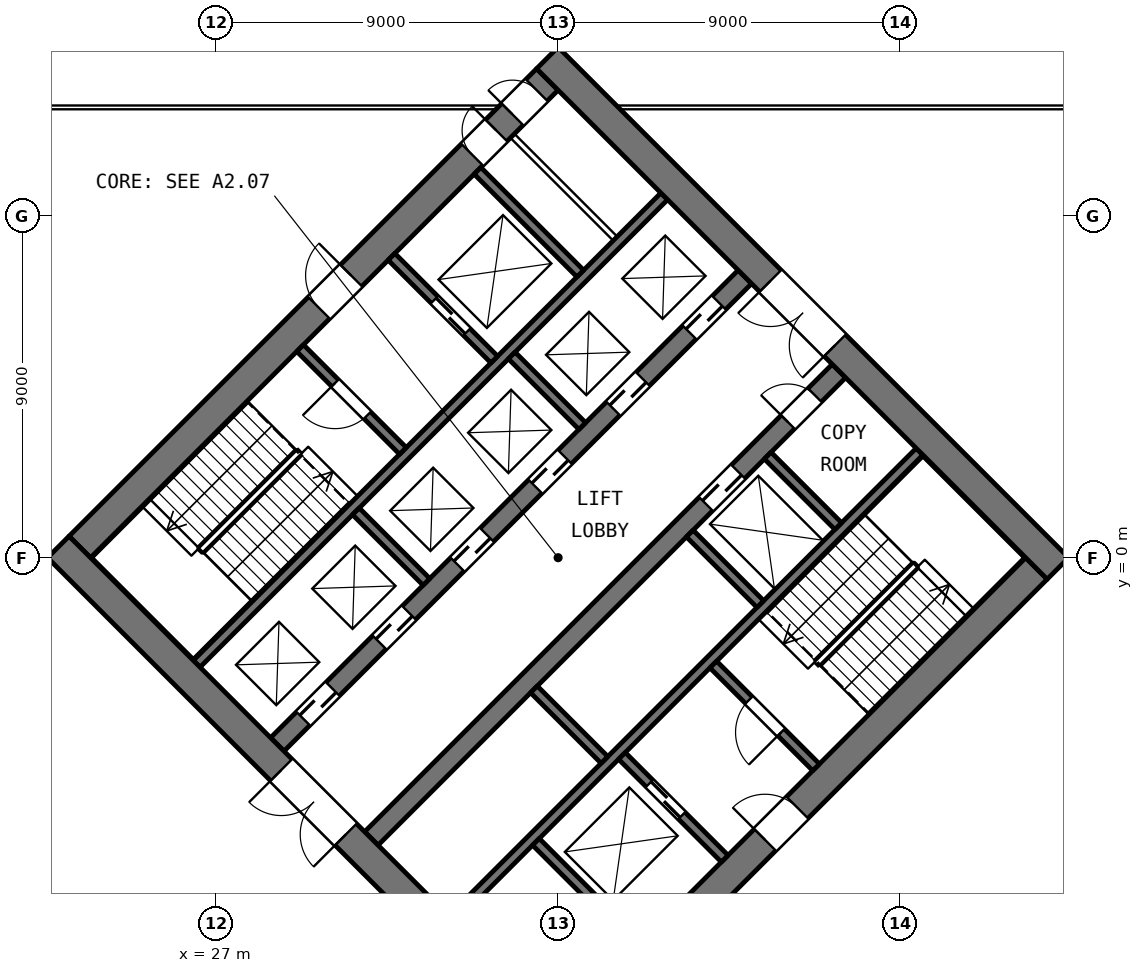
"""IFC4 building model, lengths in metres.
Left out: names, types, materials, properties, quantities, classifications, styles, units other than length and angle.
Written with IfcOpenShell. Run it as: python <this file> out.ifc"""

import sys

from ifc_helpers import new_model, si_unit, direction, frame, frame_2d, origin, place, context, subcontext, project, spatial, rectangle, extrude, element, fill, save


model = new_model("IFC4")
c1 = context("Model", 3, precision=1e-05, world=origin(), true_north=direction((0.0, 1.0)))
c2 = subcontext(c1, "Body", "Model", "MODEL_VIEW")
j1 = project(units=[si_unit("LENGTHUNIT", "METRE"), si_unit("PLANEANGLEUNIT", "RADIAN")], contexts=[c1])
p1 = place(None, origin())
s1 = spatial("IfcSite", under=j1, at=p1, CompositionType="ELEMENT")
p2 = place(p1, origin())
s2 = spatial("IfcBuilding", under=s1, at=p2, CompositionType="ELEMENT")
p3 = place(p2, frame((0.0, 0.0, 22.8)))
s3 = spatial("IfcBuildingStorey", under=s2, at=p3, CompositionType="ELEMENT", Elevation=22.8)
p4 = place(p3, frame((36.283, -12.586, 0.0), z_axis=(0.0, 0.0, 1.0), x_axis=(0.707106781187, 0.707106781187, 0.0)))
e1 = element("IfcWall", 1, at=p4, inside=s3, PredefinedType="SHEAR", context=c2, shape_type="SweptSolid", body=[
    extrude(rectangle(XDim=17.4, YDim=0.8, at=frame_2d((8.7, 0.0))), origin(), (0.0, 0.0, 1.0), 4.5),
])
p5 = place(p4, frame((7.3, 0.0, 0.0)))
e2 = element("IfcOpeningElement", 2, at=p5, cuts=e1, PredefinedType="OPENING", context=c2, shape_type="SweptSolid", body=[
    extrude(rectangle(XDim=1.2, YDim=2.1, at=frame_2d((0.6, 1.05))), frame((0.0, 0.41, 0.0), z_axis=(0.0, -1.0, 0.0), x_axis=(1.0, 0.0, 0.0)), (0.0, 0.0, 1.0), 0.82),
])
p6 = place(p4, frame((1.0, 0.0, 0.0)))
e3 = element("IfcOpeningElement", 3, at=p6, cuts=e1, PredefinedType="OPENING", context=c2, shape_type="SweptSolid", body=[
    extrude(rectangle(XDim=1.0, YDim=2.1, at=frame_2d((0.5, 1.05))), frame((0.0, 0.41, 0.0), z_axis=(0.0, -1.0, 0.0), x_axis=(1.0, 0.0, 0.0)), (0.0, 0.0, 1.0), 0.82),
])
p7 = place(p3, frame((33.207, -9.51, 0.0), z_axis=(0.0, 0.0, 1.0), x_axis=(0.707106781187, 0.707106781187, 0.0)))
e4 = element("IfcWall", 4, at=p7, inside=s3, PredefinedType="SHEAR", context=c2, shape_type="SweptSolid", body=[
    extrude(rectangle(XDim=17.4, YDim=0.25, at=frame_2d((8.7, 0.0))), origin(), (0.0, 0.0, 1.0), 4.5),
])
p8 = place(p3, frame((31.086, -7.389, 0.0), z_axis=(0.0, 0.0, 1.0), x_axis=(0.707106781187, 0.707106781187, 0.0)))
e5 = element("IfcWall", 5, at=p8, inside=s3, PredefinedType="SHEAR", context=c2, shape_type="SweptSolid", body=[
    extrude(rectangle(XDim=17.4, YDim=0.5, at=frame_2d((8.7, 0.0))), origin(), (0.0, 0.0, 1.0), 4.5),
])
p9 = place(p8, frame((12.45, 0.0, 0.0)))
e6 = element("IfcOpeningElement", 6, at=p9, cuts=e5, PredefinedType="OPENING", context=c2, shape_type="SweptSolid", body=[
    extrude(rectangle(XDim=1.2, YDim=2.1, at=frame_2d((0.6, 1.05))), frame((0.0, 0.26, 0.0), z_axis=(0.0, -1.0, 0.0), x_axis=(1.0, 0.0, 0.0)), (0.0, 0.0, 1.0), 0.52),
])
p10 = place(p8, frame((15.5, 0.0, 0.0)))
e7 = element("IfcOpeningElement", 7, at=p10, cuts=e5, PredefinedType="OPENING", context=c2, shape_type="SweptSolid", body=[
    extrude(rectangle(XDim=1.0, YDim=2.1, at=frame_2d((0.5, 1.05))), frame((0.0, 0.26, 0.0), z_axis=(0.0, -1.0, 0.0), x_axis=(1.0, 0.0, 0.0)), (0.0, 0.0, 1.0), 0.52),
])
p11 = place(p3, frame((28.611, -4.914, 0.0), z_axis=(0.0, 0.0, 1.0), x_axis=(0.707106781187, 0.707106781187, 0.0)))
e8 = element("IfcWall", 8, at=p11, inside=s3, PredefinedType="SHEAR", context=c2, shape_type="SweptSolid", body=[
    extrude(rectangle(XDim=17.4, YDim=0.5, at=frame_2d((8.7, 0.0))), origin(), (0.0, 0.0, 1.0), 4.5),
])
p12 = place(p11, frame((0.962, 0.0, 0.0)))
e9 = element("IfcOpeningElement", 9, at=p12, cuts=e8, PredefinedType="OPENING", context=c2, shape_type="SweptSolid", body=[
    extrude(rectangle(XDim=1.1, YDim=2.1, at=frame_2d((0.55, 1.05))), frame((0.0, 0.26, 0.0), z_axis=(0.0, -1.0, 0.0), x_axis=(1.0, 0.0, 0.0)), (0.0, 0.0, 1.0), 0.52),
])
p13 = place(p11, frame((3.8, 0.0, 0.0)))
e10 = element("IfcOpeningElement", 10, at=p13, cuts=e8, PredefinedType="OPENING", context=c2, shape_type="SweptSolid", body=[
    extrude(rectangle(XDim=1.1, YDim=2.1, at=frame_2d((0.55, 1.05))), frame((0.0, 0.26, 0.0), z_axis=(0.0, -1.0, 0.0), x_axis=(1.0, 0.0, 0.0)), (0.0, 0.0, 1.0), 0.52),
])
p14 = place(p11, frame((6.7, 0.0, 0.0)))
e11 = element("IfcOpeningElement", 11, at=p14, cuts=e8, PredefinedType="OPENING", context=c2, shape_type="SweptSolid", body=[
    extrude(rectangle(XDim=1.1, YDim=2.1, at=frame_2d((0.55, 1.05))), frame((0.0, 0.26, 0.0), z_axis=(0.0, -1.0, 0.0), x_axis=(1.0, 0.0, 0.0)), (0.0, 0.0, 1.0), 0.52),
])
p15 = place(p11, frame((9.6, 0.0, 0.0)))
e12 = element("IfcOpeningElement", 12, at=p15, cuts=e8, PredefinedType="OPENING", context=c2, shape_type="SweptSolid", body=[
    extrude(rectangle(XDim=1.1, YDim=2.1, at=frame_2d((0.55, 1.05))), frame((0.0, 0.26, 0.0), z_axis=(0.0, -1.0, 0.0), x_axis=(1.0, 0.0, 0.0)), (0.0, 0.0, 1.0), 0.52),
])
p16 = place(p11, frame((12.5, 0.0, 0.0)))
e13 = element("IfcOpeningElement", 13, at=p16, cuts=e8, PredefinedType="OPENING", context=c2, shape_type="SweptSolid", body=[
    extrude(rectangle(XDim=1.1, YDim=2.1, at=frame_2d((0.55, 1.05))), frame((0.0, 0.26, 0.0), z_axis=(0.0, -1.0, 0.0), x_axis=(1.0, 0.0, 0.0)), (0.0, 0.0, 1.0), 0.52),
])
p17 = place(p11, frame((15.337, 0.0, 0.0)))
e14 = element("IfcOpeningElement", 14, at=p17, cuts=e8, PredefinedType="OPENING", context=c2, shape_type="SweptSolid", body=[
    extrude(rectangle(XDim=1.1, YDim=2.1, at=frame_2d((0.55, 1.05))), frame((0.0, 0.26, 0.0), z_axis=(0.0, -1.0, 0.0), x_axis=(1.0, 0.0, 0.0)), (0.0, 0.0, 1.0), 0.52),
])
p18 = place(p3, frame((26.49, -2.793, 0.0), z_axis=(0.0, 0.0, 1.0), x_axis=(0.707106781187, 0.707106781187, 0.0)))
e15 = element("IfcWall", 15, at=p18, inside=s3, PredefinedType="SHEAR", context=c2, shape_type="SweptSolid", body=[
    extrude(rectangle(XDim=17.4, YDim=0.25, at=frame_2d((8.7, 0.0))), origin(), (0.0, 0.0, 1.0), 4.5),
])
p19 = place(p3, frame((23.414, 0.283, 0.0), z_axis=(0.0, 0.0, 1.0), x_axis=(0.707106781187, 0.707106781187, 0.0)))
e16 = element("IfcWall", 16, at=p19, inside=s3, PredefinedType="SHEAR", context=c2, shape_type="SweptSolid", body=[
    extrude(rectangle(XDim=17.4, YDim=0.8, at=frame_2d((8.7, 0.0))), origin(), (0.0, 0.0, 1.0), 4.5),
])
p20 = place(p19, frame((8.9, 0.0, 0.0)))
e17 = element("IfcOpeningElement", 17, at=p20, cuts=e16, PredefinedType="OPENING", context=c2, shape_type="SweptSolid", body=[
    extrude(rectangle(XDim=1.2, YDim=2.1, at=frame_2d((0.6, 1.05))), frame((0.0, 0.41, 0.0), z_axis=(0.0, -1.0, 0.0), x_axis=(1.0, 0.0, 0.0)), (0.0, 0.0, 1.0), 0.82),
])
p21 = place(p19, frame((14.6, 0.0, 0.0)))
e18 = element("IfcOpeningElement", 18, at=p21, cuts=e16, PredefinedType="OPENING", context=c2, shape_type="SweptSolid", body=[
    extrude(rectangle(XDim=0.9, YDim=2.1, at=frame_2d((0.45, 1.05))), frame((0.0, 0.41, 0.0), z_axis=(0.0, -1.0, 0.0), x_axis=(1.0, 0.0, 0.0)), (0.0, 0.0, 1.0), 0.82),
])
p22 = place(p19, frame((16.1, 0.0, 0.0)))
e19 = element("IfcOpeningElement", 19, at=p22, cuts=e16, PredefinedType="OPENING", context=c2, shape_type="SweptSolid", body=[
    extrude(rectangle(XDim=0.9, YDim=2.1, at=frame_2d((0.45, 1.05))), frame((0.0, 0.41, 0.0), z_axis=(0.0, -1.0, 0.0), x_axis=(1.0, 0.0, 0.0)), (0.0, 0.0, 1.0), 0.82),
])
p23 = place(p3, frame((36.283, -13.152, 0.0), z_axis=(0.0, 0.0, 1.0), x_axis=(-0.707106781187, 0.707106781187, 0.0)))
e20 = element("IfcWall", 20, at=p23, inside=s3, PredefinedType="SHEAR", context=c2, shape_type="SweptSolid", body=[
    extrude(rectangle(XDim=19.0, YDim=0.8, at=frame_2d((9.5, 0.0))), origin(), (0.0, 0.0, 1.0), 4.5),
])
p24 = place(p23, frame((8.3, 0.0, 0.0)))
e21 = element("IfcOpeningElement", 21, at=p24, cuts=e20, PredefinedType="OPENING", context=c2, shape_type="SweptSolid", body=[
    extrude(rectangle(XDim=2.4, YDim=2.1, at=frame_2d((1.2, 1.05))), frame((0.0, 0.41, 0.0), z_axis=(0.0, -1.0, 0.0), x_axis=(1.0, 0.0, 0.0)), (0.0, 0.0, 1.0), 0.82),
])
p25 = place(p3, frame((38.121, -10.182, 0.0), z_axis=(0.0, 0.0, 1.0), x_axis=(-0.707138693938, 0.707074866995, 0.0)))
e22 = element("IfcWall", 22, at=p25, inside=s3, PredefinedType="SHEAR", context=c2, shape_type="SweptSolid", body=[
    extrude(rectangle(XDim=3.825, YDim=0.25, at=frame_2d((1.913, 0.0))), origin(), (0.0, 0.0, 1.0), 4.5),
])
for number, where, z_axis, x_axis in (
    (23, (37.22, -5.321, 0.0), (0.0, 0.0, 1.0), (-0.707, 0.707, 0.0)),
    (24, (32.535, -0.636, 0.0), (0.0, 0.0, 1.0), (-0.707, 0.707, 0.0)),
):
    element("IfcWall", number, at=place(p3, frame(where, z_axis=z_axis, x_axis=x_axis)), inside=s3, PredefinedType="SHEAR", context=c2, shape_type="SweptSolid", body=[
        extrude(rectangle(XDim=2.625, YDim=0.25, at=frame_2d((1.312, 0.0))), origin(), (0.0, 0.0, 1.0), 4.5),
    ])
p26 = place(p3, frame((40.384, -7.92, 0.0), z_axis=(0.0, 0.0, 1.0), x_axis=(-0.707074866995, 0.707138693938, 0.0)))
e25 = element("IfcWall", 25, at=p26, inside=s3, PredefinedType="SHEAR", context=c2, shape_type="SweptSolid", body=[
    extrude(rectangle(XDim=3.825, YDim=0.25, at=frame_2d((1.913, 0.0))), origin(), (0.0, 0.0, 1.0), 4.5),
])
p27 = place(p26, frame((1.6, 0.0, 0.0)))
e26 = element("IfcOpeningElement", 26, at=p27, cuts=e25, PredefinedType="OPENING", context=c2, shape_type="SweptSolid", body=[
    extrude(rectangle(XDim=1.2, YDim=2.1, at=frame_2d((0.6, 1.05))), frame((0.0, 0.135, 0.0), z_axis=(0.0, -1.0, 0.0), x_axis=(1.0, 0.0, 0.0)), (0.0, 0.0, 1.0), 0.27),
])
p28 = place(p3, frame((31.917, 2.811, 0.0), z_axis=(0.0, 0.0, 1.0), x_axis=(-0.707106781187, 0.707106781187, 0.0)))
e27 = element("IfcWall", 27, at=p28, inside=s3, PredefinedType="SHEAR", context=c2, shape_type="SweptSolid", body=[
    extrude(rectangle(XDim=3.825, YDim=0.25, at=frame_2d((1.913, 0.0))), origin(), (0.0, 0.0, 1.0), 4.5),
])
p29 = place(p28, frame((1.325, 0.0, 0.0)))
e28 = element("IfcOpeningElement", 28, at=p29, cuts=e27, PredefinedType="OPENING", context=c2, shape_type="SweptSolid", body=[
    extrude(rectangle(XDim=1.2, YDim=2.1, at=frame_2d((0.6, 1.05))), frame((0.0, 0.135, 0.0), z_axis=(0.0, -1.0, 0.0), x_axis=(1.0, 0.0, 0.0)), (0.0, 0.0, 1.0), 0.27),
])
p30 = place(p3, frame((42.788, -5.515, 0.0), z_axis=(0.0, 0.0, 1.0), x_axis=(-0.707106781187, 0.707106781187, 0.0)))
e29 = element("IfcWall", 29, at=p30, inside=s3, PredefinedType="SHEAR", context=c2, shape_type="SweptSolid", body=[
    extrude(rectangle(XDim=3.825, YDim=0.25, at=frame_2d((1.913, 0.0))), origin(), (0.0, 0.0, 1.0), 4.5),
])
p31 = place(p30, frame((1.3, 0.0, 0.0)))
e30 = element("IfcOpeningElement", 30, at=p31, cuts=e29, PredefinedType="OPENING", context=c2, shape_type="SweptSolid", body=[
    extrude(rectangle(XDim=1.2, YDim=2.1, at=frame_2d((0.6, 1.05))), frame((0.0, 0.135, 0.0), z_axis=(0.0, -1.0, 0.0), x_axis=(1.0, 0.0, 0.0)), (0.0, 0.0, 1.0), 0.27),
])
p32 = place(p3, frame((34.321, 5.215, 0.0), z_axis=(0.0, 0.0, 1.0), x_axis=(-0.707074866995, 0.707138693938, 0.0)))
e31 = element("IfcWall", 31, at=p32, inside=s3, PredefinedType="SHEAR", context=c2, shape_type="SweptSolid", body=[
    extrude(rectangle(XDim=3.825, YDim=0.25, at=frame_2d((1.913, 0.0))), origin(), (0.0, 0.0, 1.0), 4.5),
])
p33 = place(p32, frame((1.025, 0.0, 0.0)))
e32 = element("IfcOpeningElement", 32, at=p33, cuts=e31, PredefinedType="OPENING", context=c2, shape_type="SweptSolid", body=[
    extrude(rectangle(XDim=1.2, YDim=2.1, at=frame_2d((0.6, 1.05))), frame((0.0, 0.135, 0.0), z_axis=(0.0, -1.0, 0.0), x_axis=(1.0, 0.0, 0.0)), (0.0, 0.0, 1.0), 0.27),
])
for number, where, z_axis, x_axis in (
    (33, (41.321, -1.22, 0.0), (0.0, 0.0, 1.0), (-0.707, 0.707, 0.0)),
    (34, (36.636, 3.465, 0.0), (0.0, 0.0, 1.0), (-0.707, 0.707, 0.0)),
):
    element("IfcWall", number, at=place(p3, frame(where, z_axis=z_axis, x_axis=x_axis)), inside=s3, PredefinedType="SHEAR", context=c2, shape_type="SweptSolid", body=[
        extrude(rectangle(XDim=2.625, YDim=0.25, at=frame_2d((1.312, 0.0))), origin(), (0.0, 0.0, 1.0), 4.5),
    ])
p34 = place(p3, frame((36.583, 7.478, 0.0), z_axis=(0.0, 0.0, 1.0), x_axis=(-0.707138693938, 0.707074866995, 0.0)))
e35 = element("IfcWall", 35, at=p34, inside=s3, PredefinedType="SHEAR", context=c2, shape_type="SweptSolid", body=[
    extrude(rectangle(XDim=3.825, YDim=0.25, at=frame_2d((1.913, 0.0))), origin(), (0.0, 0.0, 1.0), 4.5),
])
p35 = place(p3, frame((43.372, 0.831, 0.0), z_axis=(0.0, 0.0, 1.0), x_axis=(-0.707106781187, 0.707106781187, 0.0)))
e36 = element("IfcWall", 36, at=p35, inside=s3, PredefinedType="SHEAR", context=c2, shape_type="SweptSolid", body=[
    extrude(rectangle(XDim=2.625, YDim=0.25, at=frame_2d((1.312, 0.0))), origin(), (0.0, 0.0, 1.0), 4.5),
])
p36 = place(p3, frame((37.503, 8.397, 0.0), z_axis=(0.0, 0.0, 1.0), x_axis=(-0.707138693938, 0.707074866995, 0.0)))
e37 = element("IfcWall", 37, at=p36, inside=s3, PredefinedType="PARTITIONING", context=c2, shape_type="SweptSolid", body=[
    extrude(rectangle(XDim=3.825, YDim=0.15, at=frame_2d((1.913, 0.0))), origin(), (0.0, 0.0, 1.0), 4.5),
])
p37 = place(p3, frame((49.152, -0.283, 0.0), z_axis=(0.0, 0.0, 1.0), x_axis=(-0.707106781187, 0.707106781187, 0.0)))
e38 = element("IfcWall", 38, at=p37, inside=s3, PredefinedType="SHEAR", context=c2, shape_type="SweptSolid", body=[
    extrude(rectangle(XDim=19.0, YDim=0.8, at=frame_2d((9.5, 0.0))), origin(), (0.0, 0.0, 1.0), 4.5),
])
p38 = place(p37, frame((8.3, 0.0, 0.0)))
e39 = element("IfcOpeningElement", 39, at=p38, cuts=e38, PredefinedType="OPENING", context=c2, shape_type="SweptSolid", body=[
    extrude(rectangle(XDim=2.4, YDim=2.1, at=frame_2d((1.2, 1.05))), frame((0.0, 0.41, 0.0), z_axis=(0.0, -1.0, 0.0), x_axis=(1.0, 0.0, 0.0)), (0.0, 0.0, 1.0), 0.82),
])
p39 = place(p3, frame((13.0, 11.85, 0.0), z_axis=(0.0, 0.0, 1.0), x_axis=(1.0, 0.0, 0.0)))
e40 = element("IfcWall", 40, at=p39, inside=s3, PredefinedType="PARTITIONING", context=c2, shape_type="SweptSolid", body=[
    extrude(rectangle(XDim=21.415, YDim=0.1, at=frame_2d((10.708, 0.0))), origin(), (0.0, 0.0, 1.0), 4.5),
])
p40 = place(p3, frame((37.585, 11.85, 0.0), z_axis=(0.0, 0.0, 1.0), x_axis=(1.0, 0.0, 0.0)))
e41 = element("IfcWall", 41, at=p40, inside=s3, PredefinedType="PARTITIONING", context=c2, shape_type="SweptSolid", body=[
    extrude(rectangle(XDim=25.015, YDim=0.1, at=frame_2d((12.508, 0.0))), origin(), (0.0, 0.0, 1.0), 4.5),
])
p41 = place(p40, frame((12.008, 0.0, 0.0)))
e42 = element("IfcOpeningElement", 42, at=p41, cuts=e41, PredefinedType="OPENING", context=c2, shape_type="SweptSolid", body=[
    extrude(rectangle(XDim=1.0, YDim=2.1, at=frame_2d((0.5, 1.05))), frame((0.0, 0.06, 0.0), z_axis=(0.0, -1.0, 0.0), x_axis=(1.0, 0.0, 0.0)), (0.0, 0.0, 1.0), 0.12),
])
p42 = place(p24, origin())
e43 = element("IfcDoor", 43, at=p42, inside=s3, OperationType="DOUBLE_DOOR_SINGLE_SWING", PredefinedType="DOOR", context=c2, shape_type="SweptSolid", body=[
    extrude(rectangle(XDim=2.4, YDim=2.1, at=frame_2d((1.2, 1.05))), frame((0.0, -0.225, 0.0), z_axis=(0.0, -1.0, 0.0), x_axis=(1.0, 0.0, 0.0)), (0.0, 0.0, 1.0), 0.05),
])
fill(e21, e43)
p43 = place(p38, origin())
e44 = element("IfcDoor", 44, at=p43, inside=s3, OperationType="DOUBLE_DOOR_SINGLE_SWING", PredefinedType="DOOR", context=c2, shape_type="SweptSolid", body=[
    extrude(rectangle(XDim=2.4, YDim=2.1, at=frame_2d((1.2, 1.05))), frame((0.0, 0.275, 0.0), z_axis=(0.0, -1.0, 0.0), x_axis=(1.0, 0.0, 0.0)), (0.0, 0.0, 1.0), 0.05),
])
fill(e39, e44)
p44 = place(p12, origin())
e45 = element("IfcDoor", 45, at=p44, inside=s3, OperationType="SLIDING_TO_LEFT", PredefinedType="DOOR", context=c2, shape_type="SweptSolid", body=[
    extrude(rectangle(XDim=1.1, YDim=2.1, at=frame_2d((0.55, 1.05))), frame((0.0, 0.025, 0.0), z_axis=(0.0, -1.0, 0.0), x_axis=(1.0, 0.0, 0.0)), (0.0, 0.0, 1.0), 0.05),
])
fill(e9, e45)
p45 = place(p13, origin())
e46 = element("IfcDoor", 46, at=p45, inside=s3, OperationType="SLIDING_TO_LEFT", PredefinedType="DOOR", context=c2, shape_type="SweptSolid", body=[
    extrude(rectangle(XDim=1.1, YDim=2.1, at=frame_2d((0.55, 1.05))), frame((0.0, 0.025, 0.0), z_axis=(0.0, -1.0, 0.0), x_axis=(1.0, 0.0, 0.0)), (0.0, 0.0, 1.0), 0.05),
])
fill(e10, e46)
p46 = place(p14, origin())
e47 = element("IfcDoor", 47, at=p46, inside=s3, OperationType="SLIDING_TO_LEFT", PredefinedType="DOOR", context=c2, shape_type="SweptSolid", body=[
    extrude(rectangle(XDim=1.1, YDim=2.1, at=frame_2d((0.55, 1.05))), frame((0.0, 0.025, 0.0), z_axis=(0.0, -1.0, 0.0), x_axis=(1.0, 0.0, 0.0)), (0.0, 0.0, 1.0), 0.05),
])
fill(e11, e47)
p47 = place(p15, origin())
e48 = element("IfcDoor", 48, at=p47, inside=s3, OperationType="SLIDING_TO_LEFT", PredefinedType="DOOR", context=c2, shape_type="SweptSolid", body=[
    extrude(rectangle(XDim=1.1, YDim=2.1, at=frame_2d((0.55, 1.05))), frame((0.0, 0.025, 0.0), z_axis=(0.0, -1.0, 0.0), x_axis=(1.0, 0.0, 0.0)), (0.0, 0.0, 1.0), 0.05),
])
fill(e12, e48)
p48 = place(p16, origin())
e49 = element("IfcDoor", 49, at=p48, inside=s3, OperationType="SLIDING_TO_LEFT", PredefinedType="DOOR", context=c2, shape_type="SweptSolid", body=[
    extrude(rectangle(XDim=1.1, YDim=2.1, at=frame_2d((0.55, 1.05))), frame((0.0, 0.025, 0.0), z_axis=(0.0, -1.0, 0.0), x_axis=(1.0, 0.0, 0.0)), (0.0, 0.0, 1.0), 0.05),
])
fill(e13, e49)
p49 = place(p17, origin())
e50 = element("IfcDoor", 50, at=p49, inside=s3, OperationType="SLIDING_TO_LEFT", PredefinedType="DOOR", context=c2, shape_type="SweptSolid", body=[
    extrude(rectangle(XDim=1.1, YDim=2.1, at=frame_2d((0.55, 1.05))), frame((0.0, 0.025, 0.0), z_axis=(0.0, -1.0, 0.0), x_axis=(1.0, 0.0, 0.0)), (0.0, 0.0, 1.0), 0.05),
])
fill(e14, e50)
p50 = place(p9, origin())
e51 = element("IfcDoor", 51, at=p50, inside=s3, OperationType="SLIDING_TO_LEFT", PredefinedType="DOOR", context=c2, shape_type="SweptSolid", body=[
    extrude(rectangle(XDim=1.2, YDim=2.1, at=frame_2d((0.6, 1.05))), frame((0.0, 0.025, 0.0), z_axis=(0.0, -1.0, 0.0), x_axis=(1.0, 0.0, 0.0)), (0.0, 0.0, 1.0), 0.05),
])
fill(e6, e51)
p51 = place(p33, origin())
e52 = element("IfcDoor", 52, at=p51, inside=s3, OperationType="SLIDING_TO_LEFT", PredefinedType="DOOR", context=c2, shape_type="SweptSolid", body=[
    extrude(rectangle(XDim=1.2, YDim=2.1, at=frame_2d((0.6, 1.05))), frame((0.0, 0.025, 0.0), z_axis=(0.0, -1.0, 0.0), x_axis=(1.0, 0.0, 0.0)), (0.0, 0.0, 1.0), 0.05),
])
fill(e32, e52)
p52 = place(p27, origin())
e53 = element("IfcDoor", 53, at=p52, inside=s3, OperationType="SLIDING_TO_LEFT", PredefinedType="DOOR", context=c2, shape_type="SweptSolid", body=[
    extrude(rectangle(XDim=1.2, YDim=2.1, at=frame_2d((0.6, 1.05))), frame((0.0, 0.025, 0.0), z_axis=(0.0, -1.0, 0.0), x_axis=(1.0, 0.0, 0.0)), (0.0, 0.0, 1.0), 0.05),
])
fill(e26, e53)
p53 = place(p10, origin())
e54 = element("IfcDoor", 54, at=p53, inside=s3, OperationType="SINGLE_SWING_LEFT", PredefinedType="DOOR", context=c2, shape_type="SweptSolid", body=[
    extrude(rectangle(XDim=1.0, YDim=2.1, at=frame_2d((0.5, 1.05))), frame((0.0, 0.025, 0.0), z_axis=(0.0, -1.0, 0.0), x_axis=(1.0, 0.0, 0.0)), (0.0, 0.0, 1.0), 0.05),
])
fill(e7, e54)
p54 = place(p29, origin())
e55 = element("IfcDoor", 55, at=p54, inside=s3, OperationType="SINGLE_SWING_RIGHT", PredefinedType="DOOR", context=c2, shape_type="SweptSolid", body=[
    extrude(rectangle(XDim=1.2, YDim=2.1, at=frame_2d((0.6, 1.05))), frame((0.0, 0.025, 0.0), z_axis=(0.0, -1.0, 0.0), x_axis=(1.0, 0.0, 0.0)), (0.0, 0.0, 1.0), 0.05),
])
fill(e28, e55)
p55 = place(p31, origin())
e56 = element("IfcDoor", 56, at=p55, inside=s3, OperationType="SINGLE_SWING_LEFT", PredefinedType="DOOR", context=c2, shape_type="SweptSolid", body=[
    extrude(rectangle(XDim=1.2, YDim=2.1, at=frame_2d((0.6, 1.05))), frame((0.0, 0.025, 0.0), z_axis=(0.0, -1.0, 0.0), x_axis=(1.0, 0.0, 0.0)), (0.0, 0.0, 1.0), 0.05),
])
fill(e30, e56)
p56 = place(p20, origin())
e57 = element("IfcDoor", 57, at=p56, inside=s3, OperationType="SINGLE_SWING_RIGHT", PredefinedType="DOOR", context=c2, shape_type="SweptSolid", body=[
    extrude(rectangle(XDim=1.2, YDim=2.1, at=frame_2d((0.6, 1.05))), frame((0.0, -0.225, 0.0), z_axis=(0.0, -1.0, 0.0), x_axis=(1.0, 0.0, 0.0)), (0.0, 0.0, 1.0), 0.05),
])
fill(e17, e57)
p57 = place(p5, origin())
e58 = element("IfcDoor", 58, at=p57, inside=s3, OperationType="SINGLE_SWING_LEFT", PredefinedType="DOOR", context=c2, shape_type="SweptSolid", body=[
    extrude(rectangle(XDim=1.2, YDim=2.1, at=frame_2d((0.6, 1.05))), frame((0.0, 0.275, 0.0), z_axis=(0.0, -1.0, 0.0), x_axis=(1.0, 0.0, 0.0)), (0.0, 0.0, 1.0), 0.05),
])
fill(e2, e58)
p58 = place(p21, origin())
e59 = element("IfcDoor", 59, at=p58, inside=s3, OperationType="SINGLE_SWING_RIGHT", PredefinedType="DOOR", context=c2, shape_type="SweptSolid", body=[
    extrude(rectangle(XDim=0.9, YDim=2.1, at=frame_2d((0.45, 1.05))), frame((0.0, -0.225, 0.0), z_axis=(0.0, -1.0, 0.0), x_axis=(1.0, 0.0, 0.0)), (0.0, 0.0, 1.0), 0.05),
])
fill(e18, e59)
p59 = place(p22, origin())
e60 = element("IfcDoor", 60, at=p59, inside=s3, OperationType="SINGLE_SWING_LEFT", PredefinedType="DOOR", context=c2, shape_type="SweptSolid", body=[
    extrude(rectangle(XDim=0.9, YDim=2.1, at=frame_2d((0.45, 1.05))), frame((0.0, -0.225, 0.0), z_axis=(0.0, -1.0, 0.0), x_axis=(1.0, 0.0, 0.0)), (0.0, 0.0, 1.0), 0.05),
])
fill(e19, e60)
save(model, sys.argv[1])
